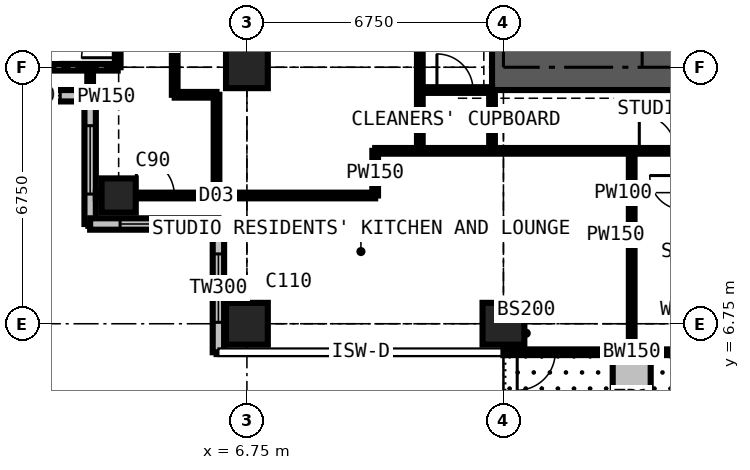
"""IFC4 building model, lengths in metres.
Left out: names, types, materials, properties, quantities, classifications, styles, units other than length and angle.
Written with IfcOpenShell. Run it as: python <this file> out.ifc"""

import sys

from ifc_helpers import new_model, si_unit, direction, frame, frame_2d, origin, origin_2d, place, context, subcontext, project, spatial, rectangle, extrude, element, fill, save


model = new_model("IFC4")
c1 = context("Model", 3, precision=1e-05, world=origin(), true_north=direction((0.0, 1.0)))
c2 = subcontext(c1, "Body", "Model", "MODEL_VIEW")
j1 = project(units=[si_unit("LENGTHUNIT", "METRE"), si_unit("PLANEANGLEUNIT", "RADIAN")], contexts=[c1])
p1 = place(None, origin())
s1 = spatial("IfcSite", under=j1, at=p1, CompositionType="ELEMENT")
p2 = place(p1, origin())
s2 = spatial("IfcBuilding", under=s1, at=p2, CompositionType="ELEMENT")
p3 = place(p2, frame((0.0, 0.0, 218.7)))
s3 = spatial("IfcBuildingStorey", under=s2, at=p3, CompositionType="ELEMENT", Elevation=218.7)
p4 = place(p3, frame((3.375, 10.125, 0.0), z_axis=(0.0, 0.0, 1.0), x_axis=(1.0, 0.0, 0.0)))
e1 = element("IfcColumn", 1, at=p4, inside=s3, PredefinedType="COLUMN", context=c2, shape_type="SweptSolid", body=[
    extrude(rectangle(XDim=0.9, YDim=0.9, at=origin_2d()), origin(), (0.0, 0.0, 1.0), 3.6),
])
for number, where, z_axis, x_axis in (
    (2, (6.75, 6.75, 0.0), (0.0, 0.0, 1.0), (1.0, 0.0, 0.0)),
    (3, (6.75, 13.5, 0.0), (0.0, 0.0, 1.0), (1.0, 0.0, 0.0)),
    (4, (13.5, 6.75, 0.0), (0.0, 0.0, 1.0), (1.0, 0.0, 0.0)),
):
    element("IfcColumn", number, at=place(p3, frame(where, z_axis=z_axis, x_axis=x_axis)), inside=s3, PredefinedType="COLUMN", context=c2, shape_type="SweptSolid", body=[
        extrude(rectangle(XDim=1.1, YDim=1.1, at=origin_2d()), origin(), (0.0, 0.0, 1.0), 3.6),
    ])
p5 = place(p3, frame((13.2, 13.5, 0.0), z_axis=(0.0, 0.0, 1.0), x_axis=(1.0, 0.0, 0.0)))
e5 = element("IfcWall", 5, at=p5, inside=s3, PredefinedType="SHEAR", context=c2, shape_type="SweptSolid", body=[
    extrude(rectangle(XDim=14.1, YDim=1.2, at=frame_2d((7.05, 0.0))), origin(), (0.0, 0.0, 1.0), 3.6),
])
p6 = place(p3, frame((-0.75, 12.75, 0.0), z_axis=(0.0, 0.0, 1.0), x_axis=(1.0, 0.0, 0.0)))
e6 = element("IfcWall", 6, at=p6, inside=s3, PredefinedType="SOLIDWALL", context=c2, shape_type="SweptSolid", body=[
    extrude(rectangle(XDim=3.375, YDim=0.3, at=frame_2d((1.688, 0.0))), origin(), (0.0, 0.0, 1.0), 3.375),
])
p7 = place(p6, frame((0.788, 0.0, 0.6)))
e7 = element("IfcOpeningElement", 7, at=p7, cuts=e6, PredefinedType="OPENING", context=c2, shape_type="SweptSolid", body=[
    extrude(rectangle(XDim=1.8, YDim=2.1, at=frame_2d((0.9, 1.05))), frame((0.0, 0.16, 0.0), z_axis=(0.0, -1.0, 0.0), x_axis=(1.0, 0.0, 0.0)), (0.0, 0.0, 1.0), 0.32),
])
p8 = place(p3, frame((2.625, 12.75, 0.0), z_axis=(0.0, 0.0, 1.0), x_axis=(0.0, -1.0, 0.0)))
e8 = element("IfcWall", 8, at=p8, inside=s3, PredefinedType="SOLIDWALL", context=c2, shape_type="SweptSolid", body=[
    extrude(rectangle(XDim=3.375, YDim=0.3, at=frame_2d((1.688, 0.0))), origin(), (0.0, 0.0, 1.0), 3.375),
])
p9 = place(p8, frame((0.788, 0.0, 0.6)))
e9 = element("IfcOpeningElement", 9, at=p9, cuts=e8, PredefinedType="OPENING", context=c2, shape_type="SweptSolid", body=[
    extrude(rectangle(XDim=1.8, YDim=2.1, at=frame_2d((0.9, 1.05))), frame((0.0, 0.16, 0.0), z_axis=(0.0, -1.0, 0.0), x_axis=(1.0, 0.0, 0.0)), (0.0, 0.0, 1.0), 0.32),
])
p10 = place(p3, frame((2.625, 9.375, 0.0), z_axis=(0.0, 0.0, 1.0), x_axis=(1.0, 0.0, 0.0)))
e10 = element("IfcWall", 10, at=p10, inside=s3, PredefinedType="SOLIDWALL", context=c2, shape_type="SweptSolid", body=[
    extrude(rectangle(XDim=3.375, YDim=0.3, at=frame_2d((1.688, 0.0))), origin(), (0.0, 0.0, 1.0), 3.375),
])
p11 = place(p10, frame((0.788, 0.0, 0.6)))
e11 = element("IfcOpeningElement", 11, at=p11, cuts=e10, PredefinedType="OPENING", context=c2, shape_type="SweptSolid", body=[
    extrude(rectangle(XDim=1.8, YDim=2.1, at=frame_2d((0.9, 1.05))), frame((0.0, 0.16, 0.0), z_axis=(0.0, -1.0, 0.0), x_axis=(1.0, 0.0, 0.0)), (0.0, 0.0, 1.0), 0.32),
])
p12 = place(p3, frame((6.0, 9.375, 0.0), z_axis=(0.0, 0.0, 1.0), x_axis=(0.0, -1.0, 0.0)))
e12 = element("IfcWall", 12, at=p12, inside=s3, PredefinedType="SOLIDWALL", context=c2, shape_type="SweptSolid", body=[
    extrude(rectangle(XDim=3.375, YDim=0.3, at=frame_2d((1.688, 0.0))), origin(), (0.0, 0.0, 1.0), 3.375),
])
p13 = place(p12, frame((0.788, 0.0, 0.6)))
e13 = element("IfcOpeningElement", 13, at=p13, cuts=e12, PredefinedType="OPENING", context=c2, shape_type="SweptSolid", body=[
    extrude(rectangle(XDim=1.8, YDim=2.1, at=frame_2d((0.9, 1.05))), frame((0.0, 0.16, 0.0), z_axis=(0.0, -1.0, 0.0), x_axis=(1.0, 0.0, 0.0)), (0.0, 0.0, 1.0), 0.32),
])
p14 = place(p3, frame((20.25, 6.0, 0.0), z_axis=(0.0, 0.0, 1.0), x_axis=(-1.0, 0.0, 0.0)))
e14 = element("IfcWall", 14, at=p14, inside=s3, PredefinedType="SOLIDWALL", context=c2, shape_type="SweptSolid", body=[
    extrude(rectangle(XDim=6.75, YDim=0.15, at=frame_2d((3.375, 0.0))), origin(), (0.0, 0.0, 1.0), 3.375),
])
p15 = place(p14, frame((0.363, 0.0, 0.0)))
e15 = element("IfcOpeningElement", 15, at=p15, cuts=e14, PredefinedType="OPENING", context=c2, shape_type="SweptSolid", body=[
    extrude(rectangle(XDim=1.0, YDim=2.2, at=frame_2d((0.5, 1.1))), frame((0.0, 0.085, 0.0), z_axis=(0.0, -1.0, 0.0), x_axis=(1.0, 0.0, 0.0)), (0.0, 0.0, 1.0), 0.17),
])
p16 = place(p14, frame((1.725, 0.0, 0.9)))
e16 = element("IfcOpeningElement", 16, at=p16, cuts=e14, PredefinedType="OPENING", context=c2, shape_type="SweptSolid", body=[
    extrude(rectangle(XDim=1.2, YDim=1.8, at=frame_2d((0.6, 0.9))), frame((0.0, 0.085, 0.0), z_axis=(0.0, -1.0, 0.0), x_axis=(1.0, 0.0, 0.0)), (0.0, 0.0, 1.0), 0.17),
])
p17 = place(p14, frame((5.387, 0.0, 0.0)))
e17 = element("IfcOpeningElement", 17, at=p17, cuts=e14, PredefinedType="OPENING", context=c2, shape_type="SweptSolid", body=[
    extrude(rectangle(XDim=1.0, YDim=2.2, at=frame_2d((0.5, 1.1))), frame((0.0, 0.085, 0.0), z_axis=(0.0, -1.0, 0.0), x_axis=(1.0, 0.0, 0.0)), (0.0, 0.0, 1.0), 0.17),
])
p18 = place(p14, frame((3.825, 0.0, 0.9)))
e18 = element("IfcOpeningElement", 18, at=p18, cuts=e14, PredefinedType="OPENING", context=c2, shape_type="SweptSolid", body=[
    extrude(rectangle(XDim=1.2, YDim=1.8, at=frame_2d((0.6, 0.9))), frame((0.0, 0.085, 0.0), z_axis=(0.0, -1.0, 0.0), x_axis=(1.0, 0.0, 0.0)), (0.0, 0.0, 1.0), 0.17),
])
p19 = place(p3, frame((16.875, 5.9, 0.0), z_axis=(0.0, 0.0, 1.0), x_axis=(0.0, -1.0, 0.0)))
e19 = element("IfcWall", 19, at=p19, inside=s3, PredefinedType="USERDEFINED", context=c2, shape_type="SweptSolid", body=[
    extrude(rectangle(XDim=2.2, YDim=1.0, at=frame_2d((1.1, 0.0))), origin(), (0.0, 0.0, 1.0), 0.9),
])
p20 = place(p3, frame((-0.734, 13.5, 0.0), z_axis=(0.0, 0.0, 1.0), x_axis=(1.0, 0.0, 0.0)))
e20 = element("IfcWall", 20, at=p20, inside=s3, PredefinedType="PARTITIONING", context=c2, shape_type="SweptSolid", body=[
    extrude(rectangle(XDim=4.084, YDim=0.175, at=frame_2d((2.042, 0.0))), origin(), (0.0, 0.0, 1.0), 2.877),
])
p21 = place(p3, frame((2.625, 12.766, 0.0), z_axis=(0.0, 0.0, 1.0), x_axis=(0.0, 1.0, 0.0)))
e21 = element("IfcWall", 21, at=p21, inside=s3, PredefinedType="PARTITIONING", context=c2, shape_type="SweptSolid", body=[
    extrude(rectangle(XDim=0.734, YDim=0.15, at=frame_2d((0.367, 0.0))), origin(), (0.0, 0.0, 1.0), 3.375),
])
p22 = place(p3, frame((2.775, 10.125, 0.0), z_axis=(0.0, 0.0, 1.0), x_axis=(1.0, 0.0, 0.0)))
e22 = element("IfcWall", 22, at=p22, inside=s3, PredefinedType="PARTITIONING", context=c2, shape_type="SweptSolid", body=[
    extrude(rectangle(XDim=7.35, YDim=0.15, at=frame_2d((3.675, 0.0))), origin(), (0.0, 0.0, 1.0), 2.877),
])
p23 = place(p22, frame((1.066, 0.0, 0.0)))
e23 = element("IfcOpeningElement", 23, at=p23, cuts=e22, PredefinedType="OPENING", context=c2, shape_type="SweptSolid", body=[
    extrude(rectangle(XDim=1.0, YDim=2.2, at=frame_2d((0.5, 1.1))), frame((0.0, 0.085, 0.0), z_axis=(0.0, -1.0, 0.0), x_axis=(1.0, 0.0, 0.0)), (0.0, 0.0, 1.0), 0.17),
])
p24 = place(p3, frame((3.35, 13.5, 0.0), z_axis=(0.0, 0.0, 1.0), x_axis=(0.0, 1.0, 0.0)))
e24 = element("IfcWall", 24, at=p24, inside=s3, PredefinedType="PARTITIONING", context=c2, shape_type="SweptSolid", body=[
    extrude(rectangle(XDim=13.5, YDim=0.15, at=frame_2d((6.75, 0.0))), origin(), (0.0, 0.0, 1.0), 3.375),
])
p25 = place(p24, frame((10.325, 0.0, 0.0)))
e25 = element("IfcOpeningElement", 25, at=p25, cuts=e24, PredefinedType="OPENING", context=c2, shape_type="SweptSolid", body=[
    extrude(rectangle(XDim=0.95, YDim=2.2, at=frame_2d((0.475, 1.1))), frame((0.0, 0.085, 0.0), z_axis=(0.0, -1.0, 0.0), x_axis=(1.0, 0.0, 0.0)), (0.0, 0.0, 1.0), 0.17),
])
p26 = place(p24, frame((0.25, 0.0, 0.0)))
e26 = element("IfcOpeningElement", 26, at=p26, cuts=e24, PredefinedType="OPENING", context=c2, shape_type="SweptSolid", body=[
    extrude(rectangle(XDim=0.95, YDim=2.2, at=frame_2d((0.475, 1.1))), frame((0.0, 0.085, 0.0), z_axis=(0.0, -1.0, 0.0), x_axis=(1.0, 0.0, 0.0)), (0.0, 0.0, 1.0), 0.17),
])
p27 = place(p24, frame((3.575, 0.0, 0.0)))
e27 = element("IfcOpeningElement", 27, at=p27, cuts=e24, PredefinedType="OPENING", context=c2, shape_type="SweptSolid", body=[
    extrude(rectangle(XDim=0.95, YDim=2.2, at=frame_2d((0.475, 1.1))), frame((0.0, 0.085, 0.0), z_axis=(0.0, -1.0, 0.0), x_axis=(1.0, 0.0, 0.0)), (0.0, 0.0, 1.0), 0.17),
])
p28 = place(p24, frame((6.95, 0.0, 0.0)))
e28 = element("IfcOpeningElement", 28, at=p28, cuts=e24, PredefinedType="OPENING", context=c2, shape_type="SweptSolid", body=[
    extrude(rectangle(XDim=0.95, YDim=2.2, at=frame_2d((0.475, 1.1))), frame((0.0, 0.085, 0.0), z_axis=(0.0, -1.0, 0.0), x_axis=(1.0, 0.0, 0.0)), (0.0, 0.0, 1.0), 0.17),
])
p29 = place(p3, frame((4.85, 12.775, 0.0), z_axis=(0.0, 0.0, 1.0), x_axis=(0.0, 1.0, 0.0)))
e29 = element("IfcWall", 29, at=p29, inside=s3, PredefinedType="PARTITIONING", context=c2, shape_type="SweptSolid", body=[
    extrude(rectangle(XDim=8.113, YDim=0.15, at=frame_2d((4.056, 0.0))), origin(), (0.0, 0.0, 1.0), 3.375),
])
p30 = place(p29, frame((3.6, 0.0, 0.0)))
e30 = element("IfcOpeningElement", 30, at=p30, cuts=e29, PredefinedType="OPENING", context=c2, shape_type="SweptSolid", body=[
    extrude(rectangle(XDim=0.95, YDim=2.2, at=frame_2d((0.475, 1.1))), frame((0.0, 0.085, 0.0), z_axis=(0.0, -1.0, 0.0), x_axis=(1.0, 0.0, 0.0)), (0.0, 0.0, 1.0), 0.17),
])
p31 = place(p3, frame((4.85, 12.775, 0.0), z_axis=(0.0, 0.0, 1.0), x_axis=(1.0, 0.0, 0.0)))
e31 = element("IfcWall", 31, at=p31, inside=s3, PredefinedType="PARTITIONING", context=c2, shape_type="SweptSolid", body=[
    extrude(rectangle(XDim=1.1, YDim=0.15, at=frame_2d((0.55, 0.0))), origin(), (0.0, 0.0, 1.0), 3.375),
])
p32 = place(p3, frame((5.95, 10.125, 0.0), z_axis=(0.0, 0.0, 1.0), x_axis=(0.0, 1.0, 0.0)))
e32 = element("IfcWall", 32, at=p32, inside=s3, PredefinedType="PARTITIONING", context=c2, shape_type="SweptSolid", body=[
    extrude(rectangle(XDim=2.65, YDim=0.15, at=frame_2d((1.325, 0.0))), origin(), (0.0, 0.0, 1.0), 3.375),
])
p33 = place(p3, frame((10.125, 10.125, 0.0), z_axis=(0.0, 0.0, 1.0), x_axis=(0.0, 1.0, 0.0)))
e33 = element("IfcWall", 33, at=p33, inside=s3, PredefinedType="PARTITIONING", context=c2, shape_type="SweptSolid", body=[
    extrude(rectangle(XDim=1.175, YDim=0.15, at=frame_2d((0.587, 0.0))), origin(), (0.0, 0.0, 1.0), 3.375),
])
p34 = place(p3, frame((10.125, 11.3, 0.0), z_axis=(0.0, 0.0, 1.0), x_axis=(1.0, 0.0, 0.0)))
e34 = element("IfcWall", 34, at=p34, inside=s3, PredefinedType="PARTITIONING", context=c2, shape_type="SweptSolid", body=[
    extrude(rectangle(XDim=20.25, YDim=0.15, at=frame_2d((10.125, 0.0))), origin(), (0.0, 0.0, 1.0), 3.375),
])
p35 = place(p34, frame((6.95, 0.0, 0.0)))
e35 = element("IfcOpeningElement", 35, at=p35, cuts=e34, PredefinedType="OPENING", context=c2, shape_type="SweptSolid", body=[
    extrude(rectangle(XDim=0.95, YDim=2.2, at=frame_2d((0.475, 1.1))), frame((0.0, 0.085, 0.0), z_axis=(0.0, -1.0, 0.0), x_axis=(1.0, 0.0, 0.0)), (0.0, 0.0, 1.0), 0.17),
])
p36 = place(p34, frame((10.375, 0.0, 0.0)))
e36 = element("IfcOpeningElement", 36, at=p36, cuts=e34, PredefinedType="OPENING", context=c2, shape_type="SweptSolid", body=[
    extrude(rectangle(XDim=0.95, YDim=2.2, at=frame_2d((0.475, 1.1))), frame((0.0, 0.085, 0.0), z_axis=(0.0, -1.0, 0.0), x_axis=(1.0, 0.0, 0.0)), (0.0, 0.0, 1.0), 0.17),
])
p37 = place(p34, frame((13.75, 0.0, 0.0)))
e37 = element("IfcOpeningElement", 37, at=p37, cuts=e34, PredefinedType="OPENING", context=c2, shape_type="SweptSolid", body=[
    extrude(rectangle(XDim=0.95, YDim=2.2, at=frame_2d((0.475, 1.1))), frame((0.0, 0.085, 0.0), z_axis=(0.0, -1.0, 0.0), x_axis=(1.0, 0.0, 0.0)), (0.0, 0.0, 1.0), 0.17),
])
p38 = place(p34, frame((17.475, 0.0, 0.0)))
e38 = element("IfcOpeningElement", 38, at=p38, cuts=e34, PredefinedType="OPENING", context=c2, shape_type="SweptSolid", body=[
    extrude(rectangle(XDim=1.0, YDim=2.2, at=frame_2d((0.5, 1.1))), frame((0.0, 0.085, 0.0), z_axis=(0.0, -1.0, 0.0), x_axis=(1.0, 0.0, 0.0)), (0.0, 0.0, 1.0), 0.17),
])
p39 = place(p3, frame((11.3, 11.3, 0.0), z_axis=(0.0, 0.0, 1.0), x_axis=(0.0, 1.0, 0.0)))
e39 = element("IfcWall", 39, at=p39, inside=s3, PredefinedType="PARTITIONING", context=c2, shape_type="SweptSolid", body=[
    extrude(rectangle(XDim=19.3, YDim=0.15, at=frame_2d((9.65, 0.0))), origin(), (0.0, 0.0, 1.0), 3.375),
])
p40 = place(p39, frame((13.525, 0.0, 0.0)))
e40 = element("IfcOpeningElement", 40, at=p40, cuts=e39, PredefinedType="OPENING", context=c2, shape_type="SweptSolid", body=[
    extrude(rectangle(XDim=1.0, YDim=2.2, at=frame_2d((0.5, 1.1))), frame((0.0, 0.085, 0.0), z_axis=(0.0, -1.0, 0.0), x_axis=(1.0, 0.0, 0.0)), (0.0, 0.0, 1.0), 0.17),
])
p41 = place(p39, frame((10.438, 0.0, 0.0)))
e41 = element("IfcOpeningElement", 41, at=p41, cuts=e39, PredefinedType="OPENING", context=c2, shape_type="SweptSolid", body=[
    extrude(rectangle(XDim=1.0, YDim=2.2, at=frame_2d((0.5, 1.1))), frame((0.0, 0.085, 0.0), z_axis=(0.0, -1.0, 0.0), x_axis=(1.0, 0.0, 0.0)), (0.0, 0.0, 1.0), 0.17),
])
p42 = place(p3, frame((11.3, 12.9, 0.0), z_axis=(0.0, 0.0, 1.0), x_axis=(1.0, 0.0, 0.0)))
e42 = element("IfcWall", 42, at=p42, inside=s3, PredefinedType="PARTITIONING", context=c2, shape_type="SweptSolid", body=[
    extrude(rectangle(XDim=1.9, YDim=0.15, at=frame_2d((0.95, 0.0))), origin(), (0.0, 0.0, 1.0), 2.877),
])
p43 = place(p42, frame((0.45, 0.0, 0.0)))
e43 = element("IfcOpeningElement", 43, at=p43, cuts=e42, PredefinedType="OPENING", context=c2, shape_type="SweptSolid", body=[
    extrude(rectangle(XDim=0.95, YDim=2.2, at=frame_2d((0.475, 1.1))), frame((0.0, 0.085, 0.0), z_axis=(0.0, -1.0, 0.0), x_axis=(1.0, 0.0, 0.0)), (0.0, 0.0, 1.0), 0.17),
])
p44 = place(p3, frame((13.2, 11.3, 0.0), z_axis=(0.0, 0.0, 1.0), x_axis=(0.0, 1.0, 0.0)))
e44 = element("IfcWall", 44, at=p44, inside=s3, PredefinedType="PARTITIONING", context=c2, shape_type="SweptSolid", body=[
    extrude(rectangle(XDim=1.6, YDim=0.15, at=frame_2d((0.8, 0.0))), origin(), (0.0, 0.0, 1.0), 3.375),
])
p45 = place(p3, frame((16.875, 6.016, 0.0), z_axis=(0.0, 0.0, 1.0), x_axis=(0.0, 1.0, 0.0)))
e45 = element("IfcWall", 45, at=p45, inside=s3, PredefinedType="PARTITIONING", context=c2, shape_type="SweptSolid", body=[
    extrude(rectangle(XDim=5.284, YDim=0.15, at=frame_2d((2.642, 0.0))), origin(), (0.0, 0.0, 1.0), 3.375),
])
p46 = place(p7, origin())
e46 = element("IfcWindow", 46, at=p46, inside=s3, PartitioningType="SINGLE_PANEL", PredefinedType="WINDOW", context=c2, shape_type="SweptSolid", body=[
    extrude(rectangle(XDim=1.8, YDim=2.1, at=frame_2d((0.9, 1.05))), frame((0.0, 0.03, 0.0), z_axis=(0.0, -1.0, 0.0), x_axis=(1.0, 0.0, 0.0)), (0.0, 0.0, 1.0), 0.06),
])
fill(e7, e46)
p47 = place(p9, origin())
e47 = element("IfcWindow", 47, at=p47, inside=s3, PartitioningType="SINGLE_PANEL", PredefinedType="WINDOW", context=c2, shape_type="SweptSolid", body=[
    extrude(rectangle(XDim=1.8, YDim=2.1, at=frame_2d((0.9, 1.05))), frame((0.0, 0.03, 0.0), z_axis=(0.0, -1.0, 0.0), x_axis=(1.0, 0.0, 0.0)), (0.0, 0.0, 1.0), 0.06),
])
fill(e9, e47)
p48 = place(p11, origin())
e48 = element("IfcWindow", 48, at=p48, inside=s3, PartitioningType="SINGLE_PANEL", PredefinedType="WINDOW", context=c2, shape_type="SweptSolid", body=[
    extrude(rectangle(XDim=1.8, YDim=2.1, at=frame_2d((0.9, 1.05))), frame((0.0, 0.03, 0.0), z_axis=(0.0, -1.0, 0.0), x_axis=(1.0, 0.0, 0.0)), (0.0, 0.0, 1.0), 0.06),
])
fill(e11, e48)
p49 = place(p13, origin())
e49 = element("IfcWindow", 49, at=p49, inside=s3, PartitioningType="SINGLE_PANEL", PredefinedType="WINDOW", context=c2, shape_type="SweptSolid", body=[
    extrude(rectangle(XDim=1.8, YDim=2.1, at=frame_2d((0.9, 1.05))), frame((0.0, 0.03, 0.0), z_axis=(0.0, -1.0, 0.0), x_axis=(1.0, 0.0, 0.0)), (0.0, 0.0, 1.0), 0.06),
])
fill(e13, e49)
p50 = place(p16, origin())
e50 = element("IfcWindow", 50, at=p50, inside=s3, PartitioningType="SINGLE_PANEL", PredefinedType="WINDOW", context=c2, shape_type="SweptSolid", body=[
    extrude(rectangle(XDim=1.2, YDim=1.8, at=frame_2d((0.6, 0.9))), frame((0.0, 0.03, 0.0), z_axis=(0.0, -1.0, 0.0), x_axis=(1.0, 0.0, 0.0)), (0.0, 0.0, 1.0), 0.06),
])
fill(e16, e50)
p51 = place(p17, origin())
e51 = element("IfcDoor", 51, at=p51, inside=s3, OperationType="SINGLE_SWING_RIGHT", PredefinedType="DOOR", context=c2, shape_type="SweptSolid", body=[
    extrude(rectangle(XDim=1.0, YDim=2.2, at=frame_2d((0.5, 1.1))), frame((0.0, 0.025, 0.0), z_axis=(0.0, -1.0, 0.0), x_axis=(1.0, 0.0, 0.0)), (0.0, 0.0, 1.0), 0.05),
])
fill(e17, e51)
p52 = place(p18, origin())
e52 = element("IfcWindow", 52, at=p52, inside=s3, PartitioningType="SINGLE_PANEL", PredefinedType="WINDOW", context=c2, shape_type="SweptSolid", body=[
    extrude(rectangle(XDim=1.2, YDim=1.8, at=frame_2d((0.6, 0.9))), frame((0.0, 0.03, 0.0), z_axis=(0.0, -1.0, 0.0), x_axis=(1.0, 0.0, 0.0)), (0.0, 0.0, 1.0), 0.06),
])
fill(e18, e52)
p53 = place(p43, origin())
e53 = element("IfcDoor", 53, at=p53, inside=s3, OperationType="SINGLE_SWING_LEFT", PredefinedType="DOOR", context=c2, shape_type="SweptSolid", body=[
    extrude(rectangle(XDim=0.95, YDim=2.2, at=frame_2d((0.475, 1.1))), frame((0.0, 0.025, 0.0), z_axis=(0.0, -1.0, 0.0), x_axis=(1.0, 0.0, 0.0)), (0.0, 0.0, 1.0), 0.05),
])
fill(e43, e53)
p54 = place(p23, origin())
e54 = element("IfcDoor", 54, at=p54, inside=s3, OperationType="SINGLE_SWING_LEFT", PredefinedType="DOOR", context=c2, shape_type="SweptSolid", body=[
    extrude(rectangle(XDim=1.0, YDim=2.2, at=frame_2d((0.5, 1.1))), frame((0.0, 0.025, 0.0), z_axis=(0.0, -1.0, 0.0), x_axis=(1.0, 0.0, 0.0)), (0.0, 0.0, 1.0), 0.05),
])
fill(e23, e54)
p55 = place(p35, origin())
e55 = element("IfcDoor", 55, at=p55, inside=s3, OperationType="SINGLE_SWING_LEFT", PredefinedType="DOOR", context=c2, shape_type="SweptSolid", body=[
    extrude(rectangle(XDim=0.95, YDim=2.2, at=frame_2d((0.475, 1.1))), frame((0.0, 0.025, 0.0), z_axis=(0.0, -1.0, 0.0), x_axis=(1.0, 0.0, 0.0)), (0.0, 0.0, 1.0), 0.05),
])
fill(e35, e55)
p56 = place(p26, origin())
e56 = element("IfcDoor", 56, at=p56, inside=s3, OperationType="SINGLE_SWING_LEFT", PredefinedType="DOOR", context=c2, shape_type="SweptSolid", body=[
    extrude(rectangle(XDim=0.95, YDim=2.2, at=frame_2d((0.475, 1.1))), frame((0.0, 0.025, 0.0), z_axis=(0.0, -1.0, 0.0), x_axis=(1.0, 0.0, 0.0)), (0.0, 0.0, 1.0), 0.05),
])
fill(e26, e56)
save(model, sys.argv[1])
